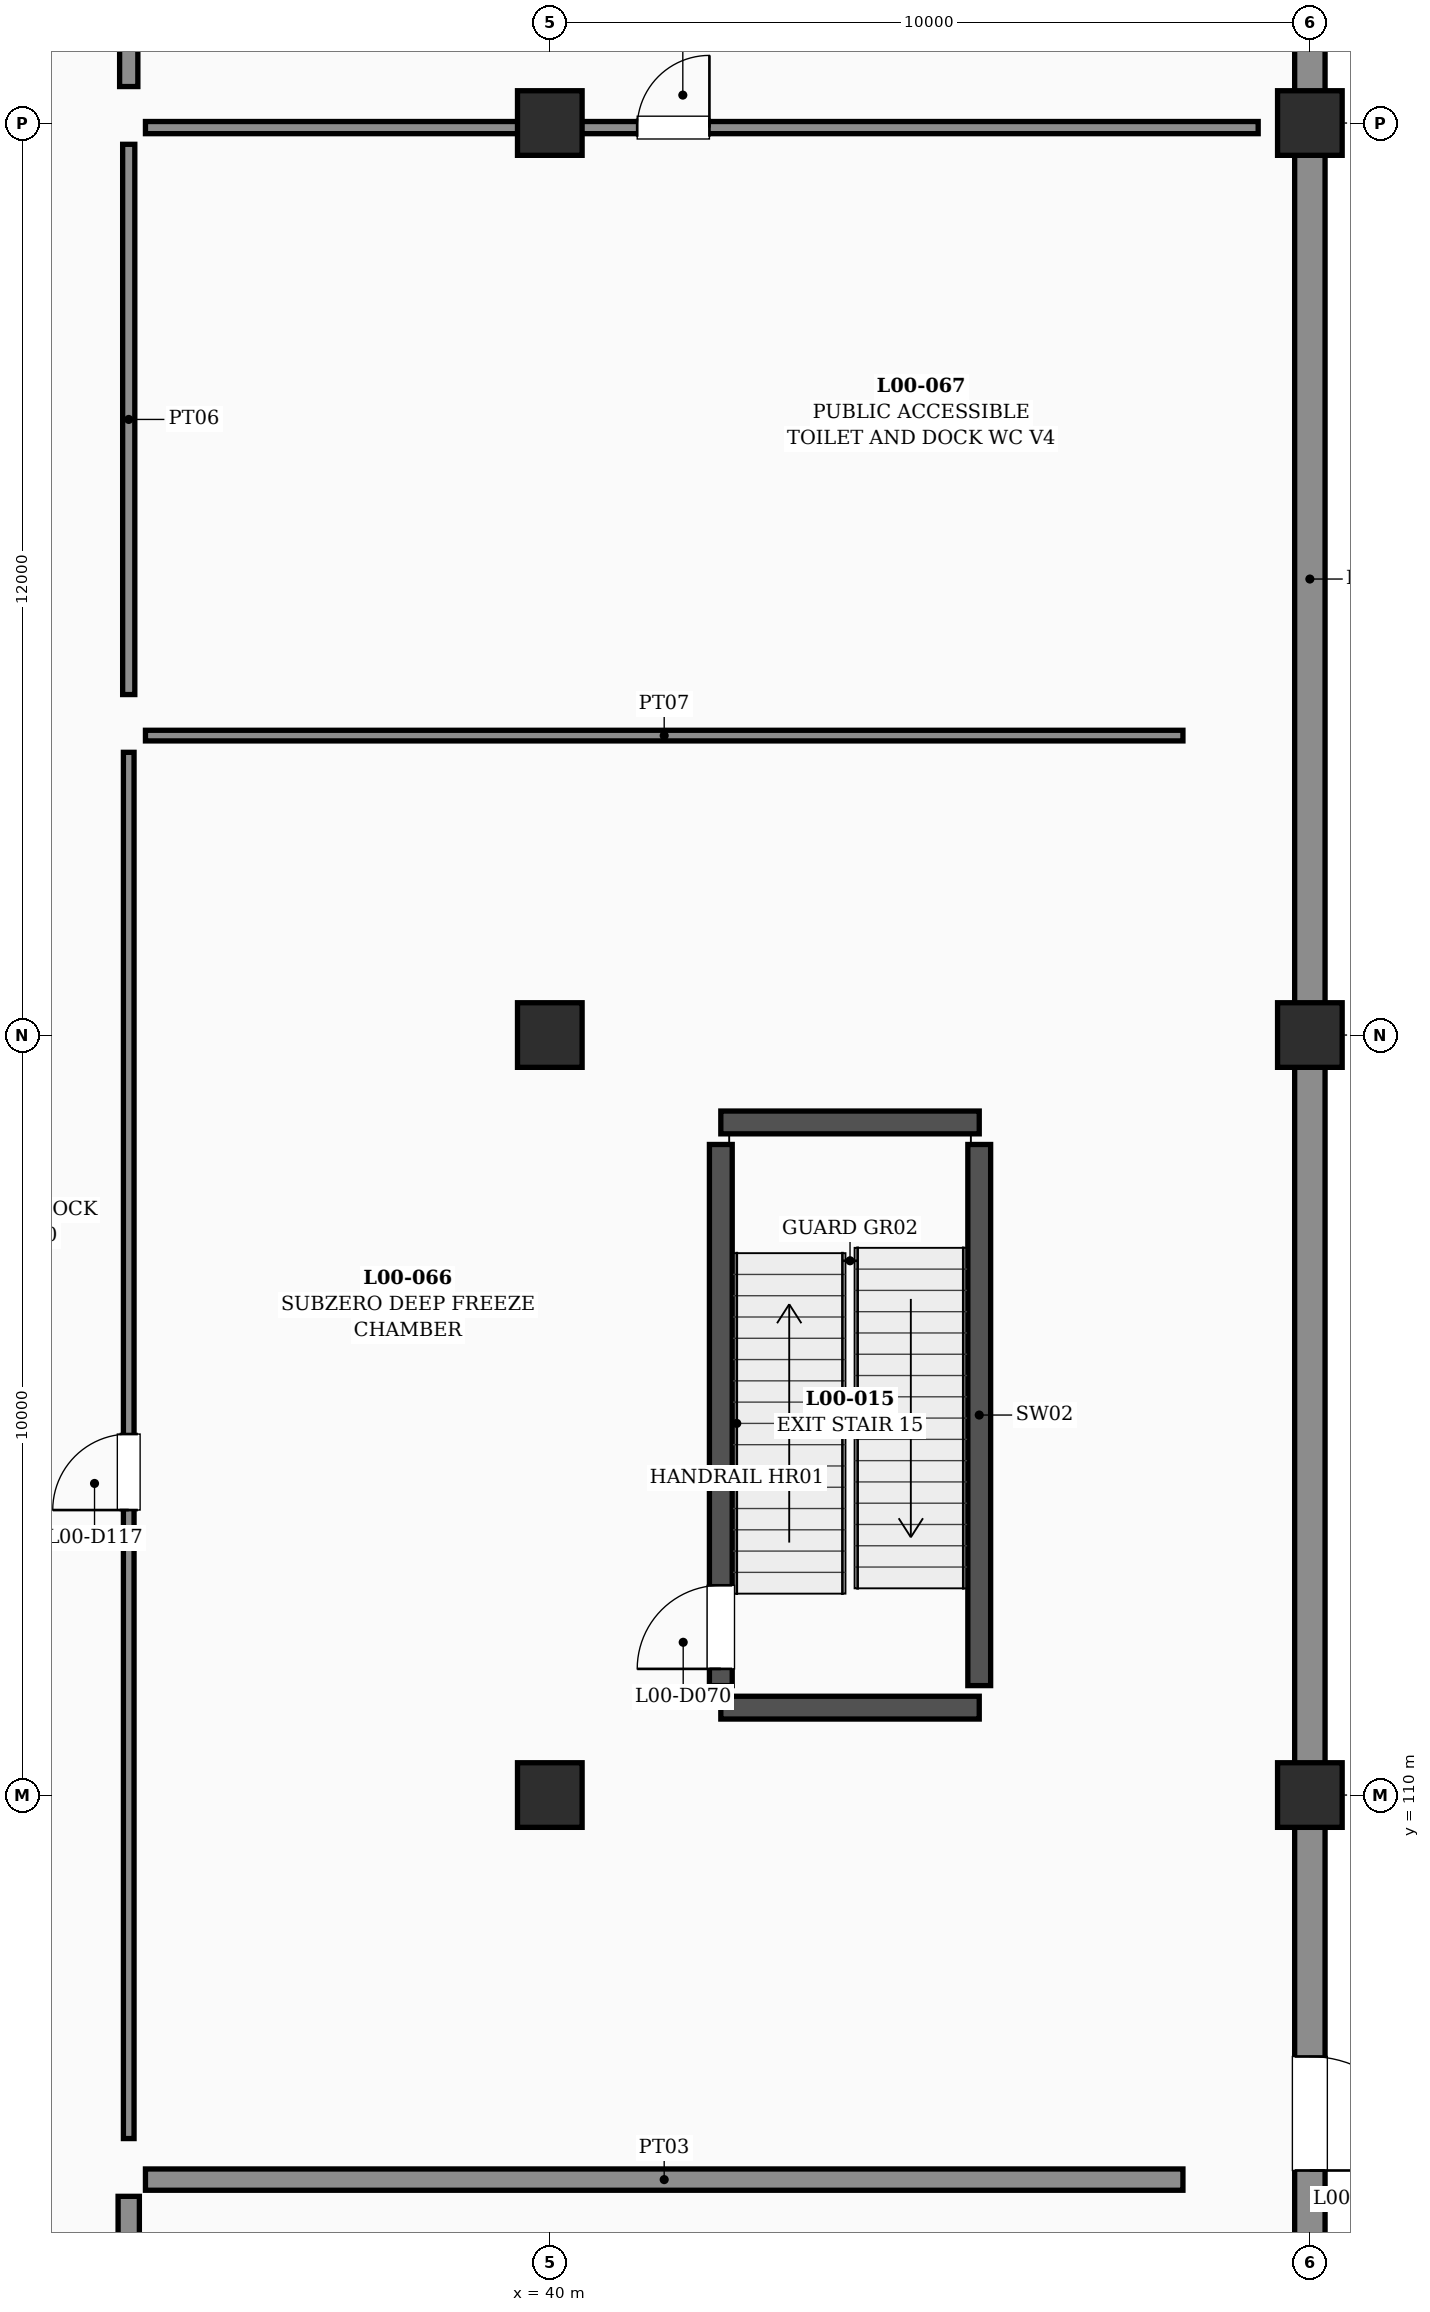
"""IFC4 building model, lengths in metres.
Left out: names, types, materials, properties, quantities, classifications, styles, units other than length and angle.
Written with IfcOpenShell. Run it as: python <this file> out.ifc"""

import sys

from ifc_helpers import new_model, si_unit, direction, frame, frame_2d, origin, origin_2d, place, context, subcontext, project, spatial, rectangle, extrude, element, fill, save


model = new_model("IFC4")
c1 = context("Model", 3, precision=1e-05, world=origin(), true_north=direction((0.0, 1.0)))
c2 = subcontext(c1, "Body", "Model", "MODEL_VIEW")
j1 = project(units=[si_unit("LENGTHUNIT", "METRE"), si_unit("PLANEANGLEUNIT", "RADIAN")], contexts=[c1])
p1 = place(None, origin())
s1 = spatial("IfcSite", under=j1, at=p1, CompositionType="ELEMENT")
p2 = place(p1, origin())
s2 = spatial("IfcBuilding", under=s1, at=p2, CompositionType="ELEMENT")
p3 = place(p2, origin())
s3 = spatial("IfcBuildingStorey", under=s2, at=p3, CompositionType="ELEMENT", Elevation=0.0)
for number, where, z_axis, x_axis in (
    (1, (40.0, 110.0, 0.0), (0.0, 0.0, 1.0), (1.0, 0.0, 0.0)),
    (2, (40.0, 120.0, 0.0), (0.0, 0.0, 1.0), (1.0, 0.0, 0.0)),
    (3, (40.0, 132.0, 0.0), (0.0, 0.0, 1.0), (1.0, 0.0, 0.0)),
    (4, (50.0, 110.0, 0.0), (0.0, 0.0, 1.0), (1.0, 0.0, 0.0)),
    (5, (50.0, 120.0, 0.0), (0.0, 0.0, 1.0), (1.0, 0.0, 0.0)),
    (6, (50.0, 132.0, 0.0), (0.0, 0.0, 1.0), (1.0, 0.0, 0.0)),
):
    element("IfcColumn", number, at=place(p3, frame(where, z_axis=z_axis, x_axis=x_axis)), inside=s3, PredefinedType="COLUMN", context=c2, shape_type="SweptSolid", body=[
        extrude(rectangle(XDim=0.85, YDim=0.85, at=origin_2d()), origin(), (0.0, 0.0, 1.0), 6.0),
    ])
p4 = place(p3, frame((50.0, 109.76, 0.0), z_axis=(0.0, 0.0, 1.0), x_axis=(0.0, -1.0, 0.0)))
e7 = element("IfcWall", 7, at=p4, inside=s3, PredefinedType="SOLIDWALL", context=c2, shape_type="SweptSolid", body=[
    extrude(rectangle(XDim=9.52, YDim=0.4, at=frame_2d((4.76, 0.0))), origin(), (0.0, 0.0, 1.0), 4.77),
])
p5 = place(p4, frame((3.2, 0.0, 0.0)))
e8 = element("IfcOpeningElement", 8, at=p5, cuts=e7, PredefinedType="OPENING", context=c2, shape_type="SweptSolid", body=[
    extrude(rectangle(XDim=1.5, YDim=2.25, at=frame_2d((0.75, 1.125))), frame((0.0, 0.21, 0.0), z_axis=(0.0, -1.0, 0.0), x_axis=(1.0, 0.0, 0.0)), (0.0, 0.0, 1.0), 0.42),
])
p6 = place(p3, frame((50.0, 119.76, 0.0), z_axis=(0.0, 0.0, 1.0), x_axis=(0.0, -1.0, 0.0)))
e9 = element("IfcWall", 9, at=p6, inside=s3, PredefinedType="SOLIDWALL", context=c2, shape_type="SweptSolid", body=[
    extrude(rectangle(XDim=9.52, YDim=0.4, at=frame_2d((4.76, 0.0))), origin(), (0.0, 0.0, 1.0), 4.77),
])
p7 = place(p3, frame((50.0, 131.76, 0.0), z_axis=(0.0, 0.0, 1.0), x_axis=(0.0, -1.0, 0.0)))
e10 = element("IfcWall", 10, at=p7, inside=s3, PredefinedType="SOLIDWALL", context=c2, shape_type="SweptSolid", body=[
    extrude(rectangle(XDim=11.52, YDim=0.4, at=frame_2d((5.76, 0.0))), origin(), (0.0, 0.0, 1.0), 4.77),
])
p8 = place(p3, frame((50.0, 141.76, 0.0), z_axis=(0.0, 0.0, 1.0), x_axis=(0.0, -1.0, 0.0)))
e11 = element("IfcWall", 11, at=p8, inside=s3, PredefinedType="SOLIDWALL", context=c2, shape_type="SweptSolid", body=[
    extrude(rectangle(XDim=9.52, YDim=0.4, at=frame_2d((4.76, 0.0))), origin(), (0.0, 0.0, 1.0), 4.77),
])
for number, where, z_axis, x_axis in (
    (12, (42.25, 111.15, 0.0), (0.0, 0.0, 1.0), (1.0, 0.0, 0.0)),
    (13, (42.25, 118.85, 0.0), (0.0, 0.0, 1.0), (1.0, 0.0, 0.0)),
):
    element("IfcWall", number, at=place(p3, frame(where, z_axis=z_axis, x_axis=x_axis)), inside=s3, PredefinedType="SHEAR", context=c2, shape_type="SweptSolid", body=[
        extrude(rectangle(XDim=3.4, YDim=0.3, at=frame_2d((1.7, 0.0))), origin(), (0.0, 0.0, 1.0), 6.0),
    ])
p9 = place(p3, frame((42.25, 111.44, 0.0), z_axis=(0.0, 0.0, 1.0), x_axis=(0.0, 1.0, 0.0)))
e14 = element("IfcWall", 14, at=p9, inside=s3, PredefinedType="SHEAR", context=c2, shape_type="SweptSolid", body=[
    extrude(rectangle(XDim=7.12, YDim=0.3, at=frame_2d((3.56, 0.0))), origin(), (0.0, 0.0, 1.0), 6.0),
])
p10 = place(p9, frame((0.22, 0.0, 0.0)))
e15 = element("IfcOpeningElement", 15, at=p10, cuts=e14, PredefinedType="OPENING", context=c2, shape_type="SweptSolid", body=[
    extrude(rectangle(XDim=1.1, YDim=2.2, at=frame_2d((0.55, 1.1))), frame((0.0, 0.16, 0.0), z_axis=(0.0, -1.0, 0.0), x_axis=(1.0, 0.0, 0.0)), (0.0, 0.0, 1.0), 0.32),
])
p11 = place(p3, frame((45.65, 111.44, 0.0), z_axis=(0.0, 0.0, 1.0), x_axis=(0.0, 1.0, 0.0)))
e16 = element("IfcWall", 16, at=p11, inside=s3, PredefinedType="SHEAR", context=c2, shape_type="SweptSolid", body=[
    extrude(rectangle(XDim=7.12, YDim=0.3, at=frame_2d((3.56, 0.0))), origin(), (0.0, 0.0, 1.0), 6.0),
])
p12 = place(p3, frame((34.46, 79.846, 0.0), z_axis=(0.0, 0.0, 1.0), x_axis=(0.0, 1.0, 0.0)))
e17 = element("IfcWall", 17, at=p12, inside=s3, PredefinedType="PARTITIONING", context=c2, shape_type="SweptSolid", body=[
    extrude(rectangle(XDim=24.874, YDim=0.28, at=frame_2d((12.437, 0.0))), origin(), (0.0, 0.0, 1.0), 4.57),
])
p13 = place(p12, frame((11.587, 0.0, 0.0)))
e18 = element("IfcOpeningElement", 18, at=p13, cuts=e17, PredefinedType="OPENING", context=c2, shape_type="SweptSolid", body=[
    extrude(rectangle(XDim=2.4, YDim=2.45, at=frame_2d((1.2, 1.225))), frame((0.0, 0.15, 0.0), z_axis=(0.0, -1.0, 0.0), x_axis=(1.0, 0.0, 0.0)), (0.0, 0.0, 1.0), 0.3),
])
p14 = place(p3, frame((34.68, 104.94, 0.0), z_axis=(0.0, 0.0, 1.0), x_axis=(1.0, 0.0, 0.0)))
e19 = element("IfcWall", 19, at=p14, inside=s3, PredefinedType="PARTITIONING", context=c2, shape_type="SweptSolid", body=[
    extrude(rectangle(XDim=13.65, YDim=0.28, at=frame_2d((6.825, 0.0))), origin(), (0.0, 0.0, 1.0), 4.57),
])
p15 = place(p3, frame((34.46, 105.48, 0.0), z_axis=(0.0, 0.0, 1.0), x_axis=(0.0, 1.0, 0.0)))
e20 = element("IfcWall", 20, at=p15, inside=s3, PredefinedType="PARTITIONING", context=c2, shape_type="SweptSolid", body=[
    extrude(rectangle(XDim=18.24, YDim=0.14, at=frame_2d((9.12, 0.0))), origin(), (0.0, 0.0, 1.0), 4.57),
])
p16 = place(p15, frame((8.27, 0.0, 0.0)))
e21 = element("IfcOpeningElement", 21, at=p16, cuts=e20, PredefinedType="OPENING", context=c2, shape_type="SweptSolid", body=[
    extrude(rectangle(XDim=1.0, YDim=2.2, at=frame_2d((0.5, 1.1))), frame((0.0, 0.08, 0.0), z_axis=(0.0, -1.0, 0.0), x_axis=(1.0, 0.0, 0.0)), (0.0, 0.0, 1.0), 0.16),
])
p17 = place(p3, frame((34.68, 123.94, 0.0), z_axis=(0.0, 0.0, 1.0), x_axis=(1.0, 0.0, 0.0)))
e22 = element("IfcWall", 22, at=p17, inside=s3, PredefinedType="PARTITIONING", context=c2, shape_type="SweptSolid", body=[
    extrude(rectangle(XDim=13.65, YDim=0.14, at=frame_2d((6.825, 0.0))), origin(), (0.0, 0.0, 1.0), 4.57),
])
p18 = place(p3, frame((34.46, 124.48, 0.0), z_axis=(0.0, 0.0, 1.0), x_axis=(0.0, 1.0, 0.0)))
e23 = element("IfcWall", 23, at=p18, inside=s3, PredefinedType="PARTITIONING", context=c2, shape_type="SweptSolid", body=[
    extrude(rectangle(XDim=7.24, YDim=0.16, at=frame_2d((3.62, 0.0))), origin(), (0.0, 0.0, 1.0), 5.62),
])
p19 = place(p3, frame((34.68, 131.94, 0.0), z_axis=(0.0, 0.0, 1.0), x_axis=(1.0, 0.0, 0.0)))
e24 = element("IfcWall", 24, at=p19, inside=s3, PredefinedType="PARTITIONING", context=c2, shape_type="SweptSolid", body=[
    extrude(rectangle(XDim=14.64, YDim=0.16, at=frame_2d((7.32, 0.0))), origin(), (0.0, 0.0, 1.0), 4.57),
])
p20 = place(p19, frame((6.47, 0.0, 0.0)))
e25 = element("IfcOpeningElement", 25, at=p20, cuts=e24, PredefinedType="OPENING", context=c2, shape_type="SweptSolid", body=[
    extrude(rectangle(XDim=0.95, YDim=2.15, at=frame_2d((0.475, 1.075))), frame((0.0, 0.09, 0.0), z_axis=(0.0, -1.0, 0.0), x_axis=(1.0, 0.0, 0.0)), (0.0, 0.0, 1.0), 0.18),
])
p21 = place(p3, frame((34.46, 132.48, 0.0), z_axis=(0.0, 0.0, 1.0), x_axis=(0.0, 1.0, 0.0)))
e26 = element("IfcWall", 26, at=p21, inside=s3, PredefinedType="PARTITIONING", context=c2, shape_type="SweptSolid", body=[
    extrude(rectangle(XDim=7.85, YDim=0.24, at=frame_2d((3.925, 0.0))), origin(), (0.0, 0.0, 1.0), 5.62),
])
p22 = place(p21, frame((3.075, 0.0, 0.0)))
e27 = element("IfcOpeningElement", 27, at=p22, cuts=e26, PredefinedType="OPENING", context=c2, shape_type="SweptSolid", body=[
    extrude(rectangle(XDim=1.4, YDim=2.25, at=frame_2d((0.7, 1.125))), frame((0.0, 0.13, 0.0), z_axis=(0.0, -1.0, 0.0), x_axis=(1.0, 0.0, 0.0)), (0.0, 0.0, 1.0), 0.26),
])
p23 = place(p5, origin())
e28 = element("IfcDoor", 28, at=p23, inside=s3, OperationType="SINGLE_SWING_RIGHT", PredefinedType="DOOR", context=c2, shape_type="SweptSolid", body=[
    extrude(rectangle(XDim=1.5, YDim=2.25, at=frame_2d((0.75, 1.125))), frame((0.0, 0.025, 0.0), z_axis=(0.0, -1.0, 0.0), x_axis=(1.0, 0.0, 0.0)), (0.0, 0.0, 1.0), 0.05),
])
fill(e8, e28)
p24 = place(p10, origin())
e29 = element("IfcDoor", 29, at=p24, inside=s3, OperationType="SINGLE_SWING_LEFT", PredefinedType="DOOR", context=c2, shape_type="SweptSolid", body=[
    extrude(rectangle(XDim=1.1, YDim=2.2, at=frame_2d((0.55, 1.1))), frame((0.0, 0.025, 0.0), z_axis=(0.0, -1.0, 0.0), x_axis=(1.0, 0.0, 0.0)), (0.0, 0.0, 1.0), 0.05),
])
fill(e15, e29)
p25 = place(p16, origin())
e30 = element("IfcDoor", 30, at=p25, inside=s3, OperationType="SINGLE_SWING_LEFT", PredefinedType="DOOR", context=c2, shape_type="SweptSolid", body=[
    extrude(rectangle(XDim=1.0, YDim=2.2, at=frame_2d((0.5, 1.1))), frame((0.0, 0.025, 0.0), z_axis=(0.0, -1.0, 0.0), x_axis=(1.0, 0.0, 0.0)), (0.0, 0.0, 1.0), 0.05),
])
fill(e21, e30)
p26 = place(p20, origin())
e31 = element("IfcDoor", 31, at=p26, inside=s3, OperationType="SINGLE_SWING_RIGHT", PredefinedType="DOOR", context=c2, shape_type="SweptSolid", body=[
    extrude(rectangle(XDim=0.95, YDim=2.15, at=frame_2d((0.475, 1.075))), frame((0.0, 0.025, 0.0), z_axis=(0.0, -1.0, 0.0), x_axis=(1.0, 0.0, 0.0)), (0.0, 0.0, 1.0), 0.05),
])
fill(e25, e31)
save(model, sys.argv[1])
